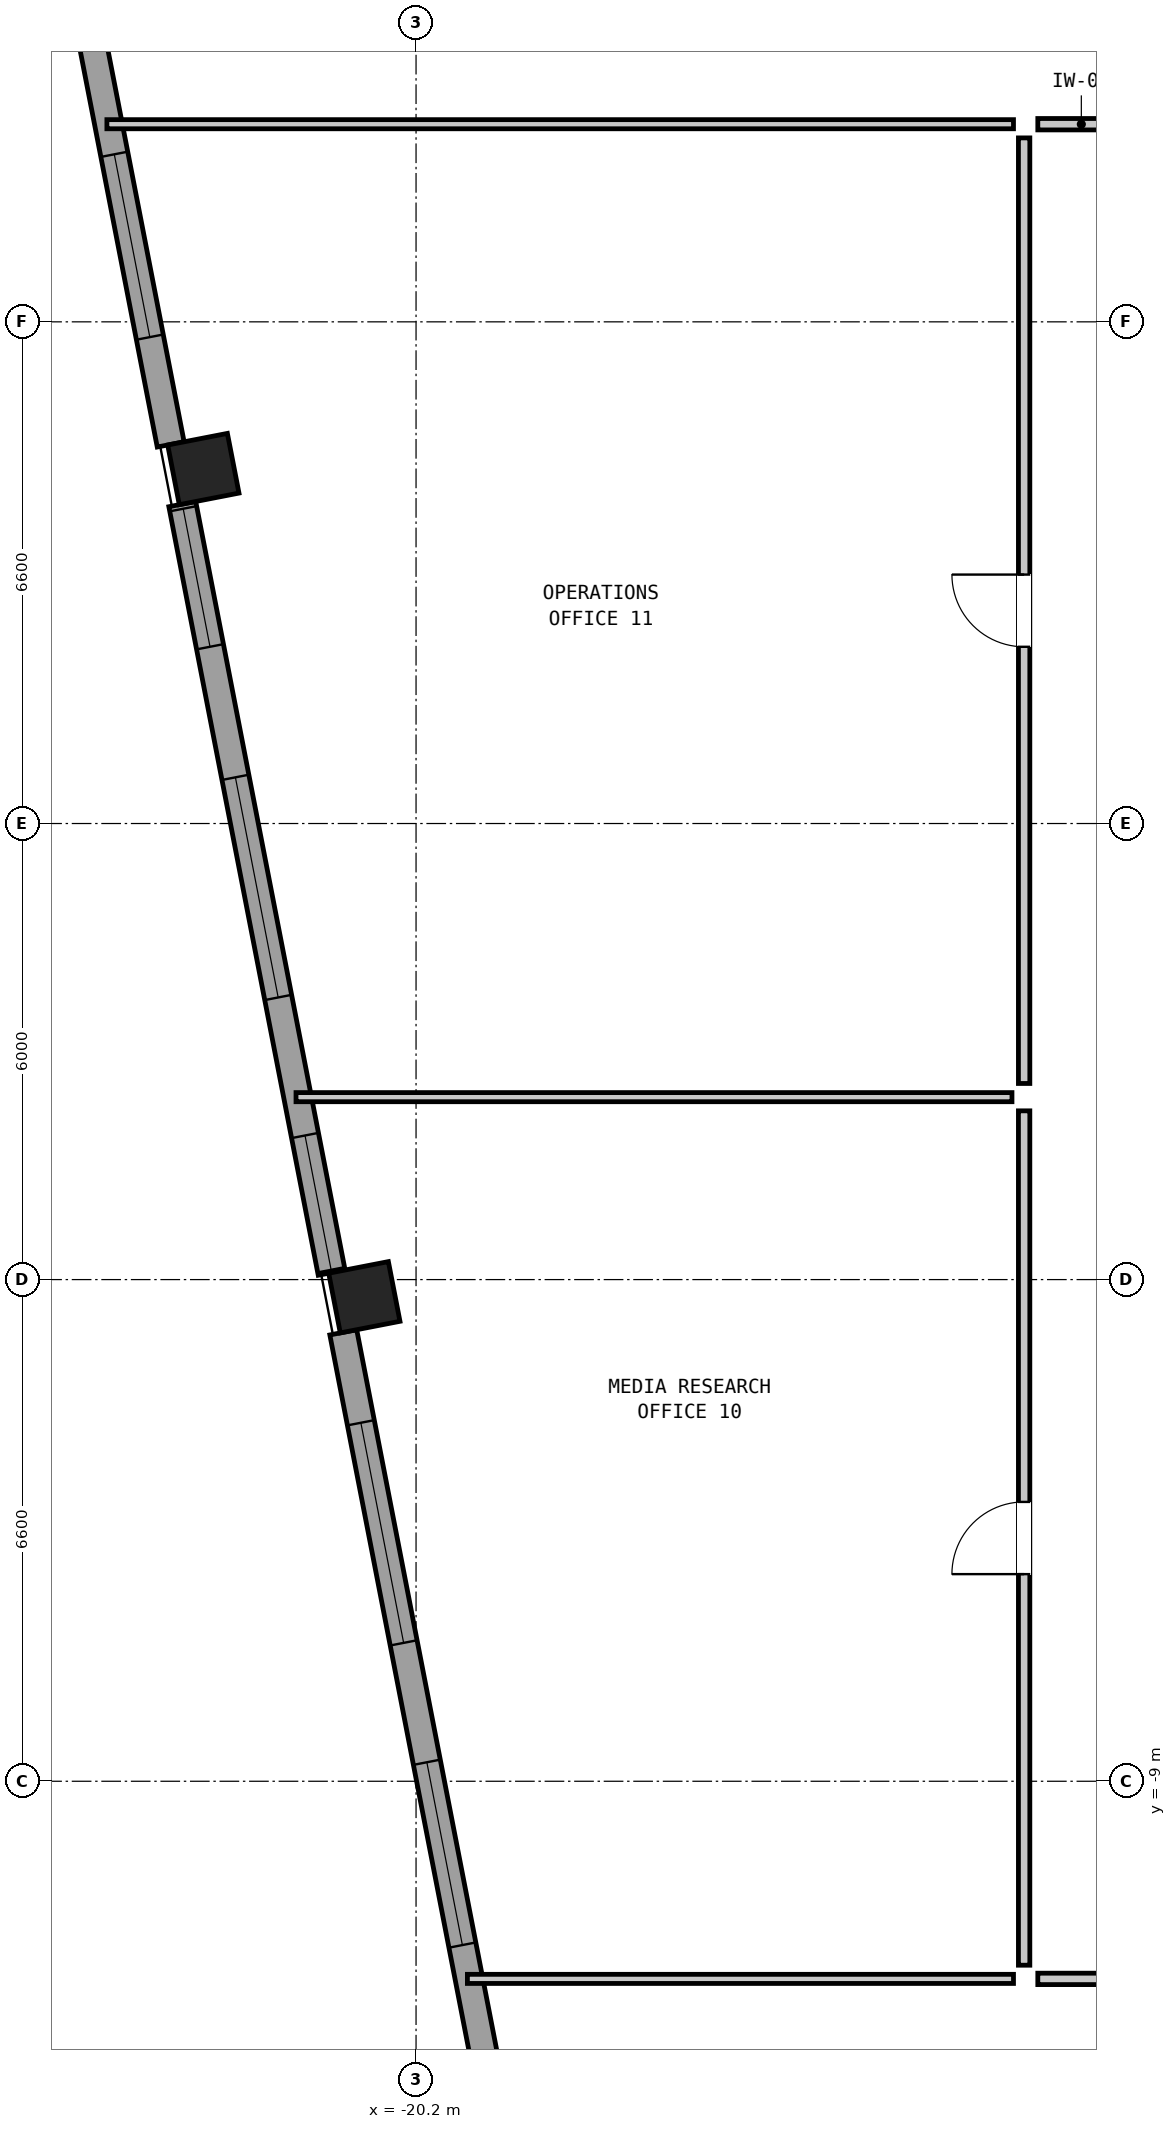
"""IFC4 building model, lengths in metres.
Left out: names, types, materials, properties, quantities, classifications, styles, units other than length and angle.
Written with IfcOpenShell. Run it as: python <this file> out.ifc"""

import sys

from ifc_helpers import new_model, si_unit, direction, frame, frame_2d, origin, origin_2d, place, context, subcontext, project, spatial, rectangle, hollow_rectangle, extrude, element, fill, save


model = new_model("IFC4")
c1 = context("Model", 3, precision=1e-05, world=origin(), true_north=direction((0.0, 1.0)))
c2 = subcontext(c1, "Body", "Model", "MODEL_VIEW")
j1 = project(units=[si_unit("LENGTHUNIT", "METRE"), si_unit("PLANEANGLEUNIT", "RADIAN")], contexts=[c1])
p1 = place(None, origin())
s1 = spatial("IfcSite", under=j1, at=p1, CompositionType="ELEMENT")
p2 = place(p1, origin())
s2 = spatial("IfcBuilding", under=s1, at=p2, CompositionType="ELEMENT")
p3 = place(p2, frame((0.0, 0.0, 121.95)))
s3 = spatial("IfcBuildingStorey", under=s2, at=p3, CompositionType="ELEMENT", Elevation=121.95)
for number, where, z_axis, x_axis in (
    (1, (-22.998, 8.263, 0.0), (0.0, 0.0, 1.0), (-0.191, 0.982, 0.0)),
    (2, (-20.88, -2.633, 0.0), (0.0, 0.0, 1.0), (-0.191, 0.982, 0.0)),
):
    element("IfcColumn", number, at=place(p3, frame(where, z_axis=z_axis, x_axis=x_axis)), inside=s3, PredefinedType="COLUMN", context=c2, shape_type="SweptSolid", body=[
        extrude(hollow_rectangle(XDim=0.8, YDim=0.8, WallThickness=0.05, at=origin_2d()), origin(), (0.0, 0.0, 1.0), 3.05),
    ])
p4 = place(p3, frame((-19.19, -13.217, 0.0), z_axis=(0.0, 0.0, 1.0), x_axis=(-0.190822765986, 0.981624506612, 0.0)))
e3 = element("IfcWall", 3, at=p4, inside=s3, PredefinedType="SOLIDWALL", context=c2, shape_type="SweptSolid", body=[
    extrude(rectangle(XDim=10.312, YDim=0.36, at=frame_2d((5.156, 0.0))), origin(), (0.0, 0.0, 1.0), 2.067),
])
p5 = place(p4, frame((2.1, 0.0, 0.2)))
e4 = element("IfcOpeningElement", 4, at=p5, cuts=e3, PredefinedType="OPENING", context=c2, shape_type="SweptSolid", body=[
    extrude(rectangle(XDim=2.45, YDim=1.1, at=frame_2d((1.225, 0.55))), frame((0.0, 0.192, 0.0), z_axis=(0.0, -1.0, 0.0), x_axis=(1.0, 0.0, 0.0)), (0.0, 0.0, 1.0), 0.384),
])
p6 = place(p4, frame((6.15, 0.0, 0.95)))
e5 = element("IfcOpeningElement", 5, at=p6, cuts=e3, PredefinedType="OPENING", context=c2, shape_type="SweptSolid", body=[
    extrude(rectangle(XDim=2.95, YDim=0.95, at=frame_2d((1.475, 0.475))), frame((0.0, 0.192, 0.0), z_axis=(0.0, -1.0, 0.0), x_axis=(1.0, 0.0, 0.0)), (0.0, 0.0, 1.0), 0.384),
])
p7 = place(p3, frame((-21.31, -2.309, 0.0), z_axis=(0.0, 0.0, 1.0), x_axis=(-0.190811924826, 0.981626614016, 0.0)))
e6 = element("IfcWall", 6, at=p7, inside=s3, PredefinedType="SOLIDWALL", context=c2, shape_type="SweptSolid", body=[
    extrude(rectangle(XDim=10.3, YDim=0.36, at=frame_2d((5.15, 0.0))), origin(), (0.0, 0.0, 1.0), 2.067),
])
p8 = place(p7, frame((0.038, 0.0, 0.2)))
e7 = element("IfcOpeningElement", 7, at=p8, cuts=e6, PredefinedType="OPENING", context=c2, shape_type="SweptSolid", body=[
    extrude(rectangle(XDim=1.8, YDim=1.25, at=frame_2d((0.9, 0.625))), frame((0.0, 0.192, 0.0), z_axis=(0.0, -1.0, 0.0), x_axis=(1.0, 0.0, 0.0)), (0.0, 0.0, 1.0), 0.384),
])
p9 = place(p7, frame((3.688, 0.0, 0.95)))
e8 = element("IfcOpeningElement", 8, at=p9, cuts=e6, PredefinedType="OPENING", context=c2, shape_type="SweptSolid", body=[
    extrude(rectangle(XDim=2.95, YDim=0.95, at=frame_2d((1.475, 0.475))), frame((0.0, 0.192, 0.0), z_axis=(0.0, -1.0, 0.0), x_axis=(1.0, 0.0, 0.0)), (0.0, 0.0, 1.0), 0.384),
])
p10 = place(p7, frame((8.388, 0.0, 0.2)))
e9 = element("IfcOpeningElement", 9, at=p10, cuts=e6, PredefinedType="OPENING", context=c2, shape_type="SweptSolid", body=[
    extrude(rectangle(XDim=1.85, YDim=1.2, at=frame_2d((0.925, 0.6))), frame((0.0, 0.192, 0.0), z_axis=(0.0, -1.0, 0.0), x_axis=(1.0, 0.0, 0.0)), (0.0, 0.0, 1.0), 0.384),
])
p11 = place(p3, frame((-23.428, 8.587, 0.0), z_axis=(0.0, 0.0, 1.0), x_axis=(-0.190822765986, 0.981624506612, 0.0)))
e10 = element("IfcWall", 10, at=p11, inside=s3, PredefinedType="SOLIDWALL", context=c2, shape_type="SweptSolid", body=[
    extrude(rectangle(XDim=10.312, YDim=0.36, at=frame_2d((5.156, 0.0))), origin(), (0.0, 0.0, 1.0), 2.067),
])
p12 = place(p11, frame((1.438, 0.0, 0.8)))
e11 = element("IfcOpeningElement", 11, at=p12, cuts=e10, PredefinedType="OPENING", context=c2, shape_type="SweptSolid", body=[
    extrude(rectangle(XDim=2.45, YDim=1.1, at=frame_2d((1.225, 0.55))), frame((0.0, 0.192, 0.0), z_axis=(0.0, -1.0, 0.0), x_axis=(1.0, 0.0, 0.0)), (0.0, 0.0, 1.0), 0.384),
])
p13 = place(p11, frame((5.438, 0.0, 0.2)))
e12 = element("IfcOpeningElement", 12, at=p13, cuts=e10, PredefinedType="OPENING", context=c2, shape_type="SweptSolid", body=[
    extrude(rectangle(XDim=3.1, YDim=0.9, at=frame_2d((1.55, 0.45))), frame((0.0, 0.192, 0.0), z_axis=(0.0, -1.0, 0.0), x_axis=(1.0, 0.0, 0.0)), (0.0, 0.0, 1.0), 0.384),
])
p14 = place(p3, frame((-24.267, 12.8, 0.0), z_axis=(0.0, 0.0, 1.0), x_axis=(1.0, 0.0, 0.0)))
e13 = element("IfcWall", 13, at=p14, inside=s3, PredefinedType="PARTITIONING", context=c2, shape_type="SweptSolid", body=[
    extrude(rectangle(XDim=11.927, YDim=0.12, at=frame_2d((5.964, 0.0))), origin(), (0.0, 0.0, 1.0), 2.83),
])
p15 = place(p3, frame((-19.524, -11.6, 0.0), z_axis=(0.0, 0.0, 1.0), x_axis=(1.0, 0.0, 0.0)))
e14 = element("IfcWall", 14, at=p15, inside=s3, PredefinedType="PARTITIONING", context=c2, shape_type="SweptSolid", body=[
    extrude(rectangle(XDim=7.184, YDim=0.12, at=frame_2d((3.592, 0.0))), origin(), (0.0, 0.0, 1.0), 2.347),
])
p16 = place(p3, frame((-21.779, 0.0, 0.0), z_axis=(0.0, 0.0, 1.0), x_axis=(1.0, 0.0, 0.0)))
e15 = element("IfcWall", 15, at=p16, inside=s3, PredefinedType="PARTITIONING", context=c2, shape_type="SweptSolid", body=[
    extrude(rectangle(XDim=9.419, YDim=0.12, at=frame_2d((4.709, 0.0))), origin(), (0.0, 0.0, 1.0), 2.83),
])
p17 = place(p3, frame((-12.02, 12.8, 0.0), z_axis=(0.0, 0.0, 1.0), x_axis=(1.0, 0.0, 0.0)))
e16 = element("IfcWall", 16, at=p17, inside=s3, PredefinedType="PARTITIONING", context=c2, shape_type="SweptSolid", body=[
    extrude(rectangle(XDim=3.44, YDim=0.15, at=frame_2d((1.72, 0.0))), origin(), (0.0, 0.0, 1.0), 2.83),
])
p18 = place(p17, frame((1.245, 0.0, 0.0)))
e17 = element("IfcOpeningElement", 17, at=p18, cuts=e16, PredefinedType="OPENING", context=c2, shape_type="SweptSolid", body=[
    extrude(rectangle(XDim=0.95, YDim=2.1, at=frame_2d((0.475, 1.05))), frame((0.0, 0.087, 0.0), z_axis=(0.0, -1.0, 0.0), x_axis=(1.0, 0.0, 0.0)), (0.0, 0.0, 1.0), 0.174),
])
p19 = place(p3, frame((-12.02, -11.6, 0.0), z_axis=(0.0, 0.0, 1.0), x_axis=(1.0, 0.0, 0.0)))
e18 = element("IfcWall", 18, at=p19, inside=s3, PredefinedType="PARTITIONING", context=c2, shape_type="SweptSolid", body=[
    extrude(rectangle(XDim=4.04, YDim=0.15, at=frame_2d((2.02, 0.0))), origin(), (0.0, 0.0, 1.0), 2.347),
])
p20 = place(p19, frame((1.345, 0.0, 0.0)))
e19 = element("IfcOpeningElement", 19, at=p20, cuts=e18, PredefinedType="OPENING", context=c2, shape_type="SweptSolid", body=[
    extrude(rectangle(XDim=0.95, YDim=2.1, at=frame_2d((0.475, 1.05))), frame((0.0, 0.087, 0.0), z_axis=(0.0, -1.0, 0.0), x_axis=(1.0, 0.0, 0.0)), (0.0, 0.0, 1.0), 0.174),
])
p21 = place(p3, frame((-12.2, -11.42, 0.0), z_axis=(0.0, 0.0, 1.0), x_axis=(0.0, 1.0, 0.0)))
e20 = element("IfcWall", 20, at=p21, inside=s3, PredefinedType="PARTITIONING", context=c2, shape_type="SweptSolid", body=[
    extrude(rectangle(XDim=11.24, YDim=0.15, at=frame_2d((5.62, 0.0))), origin(), (0.0, 0.0, 1.0), 2.83),
])
p22 = place(p21, frame((5.145, 0.0, 0.0)))
e21 = element("IfcOpeningElement", 21, at=p22, cuts=e20, PredefinedType="OPENING", context=c2, shape_type="SweptSolid", body=[
    extrude(rectangle(XDim=0.95, YDim=2.1, at=frame_2d((0.475, 1.05))), frame((0.0, 0.087, 0.0), z_axis=(0.0, -1.0, 0.0), x_axis=(1.0, 0.0, 0.0)), (0.0, 0.0, 1.0), 0.174),
])
p23 = place(p3, frame((-12.2, 0.18, 0.0), z_axis=(0.0, 0.0, 1.0), x_axis=(0.0, 1.0, 0.0)))
e22 = element("IfcWall", 22, at=p23, inside=s3, PredefinedType="PARTITIONING", context=c2, shape_type="SweptSolid", body=[
    extrude(rectangle(XDim=12.44, YDim=0.15, at=frame_2d((6.22, 0.0))), origin(), (0.0, 0.0, 1.0), 2.83),
])
p24 = place(p23, frame((5.745, 0.0, 0.0)))
e23 = element("IfcOpeningElement", 23, at=p24, cuts=e22, PredefinedType="OPENING", context=c2, shape_type="SweptSolid", body=[
    extrude(rectangle(XDim=0.95, YDim=2.1, at=frame_2d((0.475, 1.05))), frame((0.0, 0.087, 0.0), z_axis=(0.0, -1.0, 0.0), x_axis=(1.0, 0.0, 0.0)), (0.0, 0.0, 1.0), 0.174),
])
p25 = place(p5, origin())
e24 = element("IfcWindow", 24, at=p25, inside=s3, PartitioningType="SINGLE_PANEL", PredefinedType="WINDOW", context=c2, shape_type="SweptSolid", body=[
    extrude(rectangle(XDim=2.45, YDim=1.1, at=frame_2d((1.225, 0.55))), frame((0.0, 0.03, 0.0), z_axis=(0.0, -1.0, 0.0), x_axis=(1.0, 0.0, 0.0)), (0.0, 0.0, 1.0), 0.06),
])
fill(e4, e24)
p26 = place(p6, origin())
e25 = element("IfcWindow", 25, at=p26, inside=s3, PartitioningType="SINGLE_PANEL", PredefinedType="WINDOW", context=c2, shape_type="SweptSolid", body=[
    extrude(rectangle(XDim=2.95, YDim=0.95, at=frame_2d((1.475, 0.475))), frame((0.0, 0.03, 0.0), z_axis=(0.0, -1.0, 0.0), x_axis=(1.0, 0.0, 0.0)), (0.0, 0.0, 1.0), 0.06),
])
fill(e5, e25)
p27 = place(p8, origin())
e26 = element("IfcWindow", 26, at=p27, inside=s3, PartitioningType="SINGLE_PANEL", PredefinedType="WINDOW", context=c2, shape_type="SweptSolid", body=[
    extrude(rectangle(XDim=1.8, YDim=1.25, at=frame_2d((0.9, 0.625))), frame((0.0, 0.03, 0.0), z_axis=(0.0, -1.0, 0.0), x_axis=(1.0, 0.0, 0.0)), (0.0, 0.0, 1.0), 0.06),
])
fill(e7, e26)
p28 = place(p9, origin())
e27 = element("IfcWindow", 27, at=p28, inside=s3, PartitioningType="SINGLE_PANEL", PredefinedType="WINDOW", context=c2, shape_type="SweptSolid", body=[
    extrude(rectangle(XDim=2.95, YDim=0.95, at=frame_2d((1.475, 0.475))), frame((0.0, 0.03, 0.0), z_axis=(0.0, -1.0, 0.0), x_axis=(1.0, 0.0, 0.0)), (0.0, 0.0, 1.0), 0.06),
])
fill(e8, e27)
p29 = place(p10, origin())
e28 = element("IfcWindow", 28, at=p29, inside=s3, PartitioningType="SINGLE_PANEL", PredefinedType="WINDOW", context=c2, shape_type="SweptSolid", body=[
    extrude(rectangle(XDim=1.85, YDim=1.2, at=frame_2d((0.925, 0.6))), frame((0.0, 0.03, 0.0), z_axis=(0.0, -1.0, 0.0), x_axis=(1.0, 0.0, 0.0)), (0.0, 0.0, 1.0), 0.06),
])
fill(e9, e28)
p30 = place(p12, origin())
e29 = element("IfcWindow", 29, at=p30, inside=s3, PartitioningType="SINGLE_PANEL", PredefinedType="WINDOW", context=c2, shape_type="SweptSolid", body=[
    extrude(rectangle(XDim=2.45, YDim=1.1, at=frame_2d((1.225, 0.55))), frame((0.0, 0.03, 0.0), z_axis=(0.0, -1.0, 0.0), x_axis=(1.0, 0.0, 0.0)), (0.0, 0.0, 1.0), 0.06),
])
fill(e11, e29)
p31 = place(p22, origin())
e30 = element("IfcDoor", 30, at=p31, inside=s3, OperationType="SINGLE_SWING_LEFT", PredefinedType="DOOR", context=c2, shape_type="SweptSolid", body=[
    extrude(rectangle(XDim=0.95, YDim=2.1, at=frame_2d((0.475, 1.05))), frame((0.0, 0.025, 0.0), z_axis=(0.0, -1.0, 0.0), x_axis=(1.0, 0.0, 0.0)), (0.0, 0.0, 1.0), 0.05),
])
fill(e21, e30)
p32 = place(p24, origin())
e31 = element("IfcDoor", 31, at=p32, inside=s3, OperationType="SINGLE_SWING_RIGHT", PredefinedType="DOOR", context=c2, shape_type="SweptSolid", body=[
    extrude(rectangle(XDim=0.95, YDim=2.1, at=frame_2d((0.475, 1.05))), frame((0.0, 0.025, 0.0), z_axis=(0.0, -1.0, 0.0), x_axis=(1.0, 0.0, 0.0)), (0.0, 0.0, 1.0), 0.05),
])
fill(e23, e31)
save(model, sys.argv[1])
